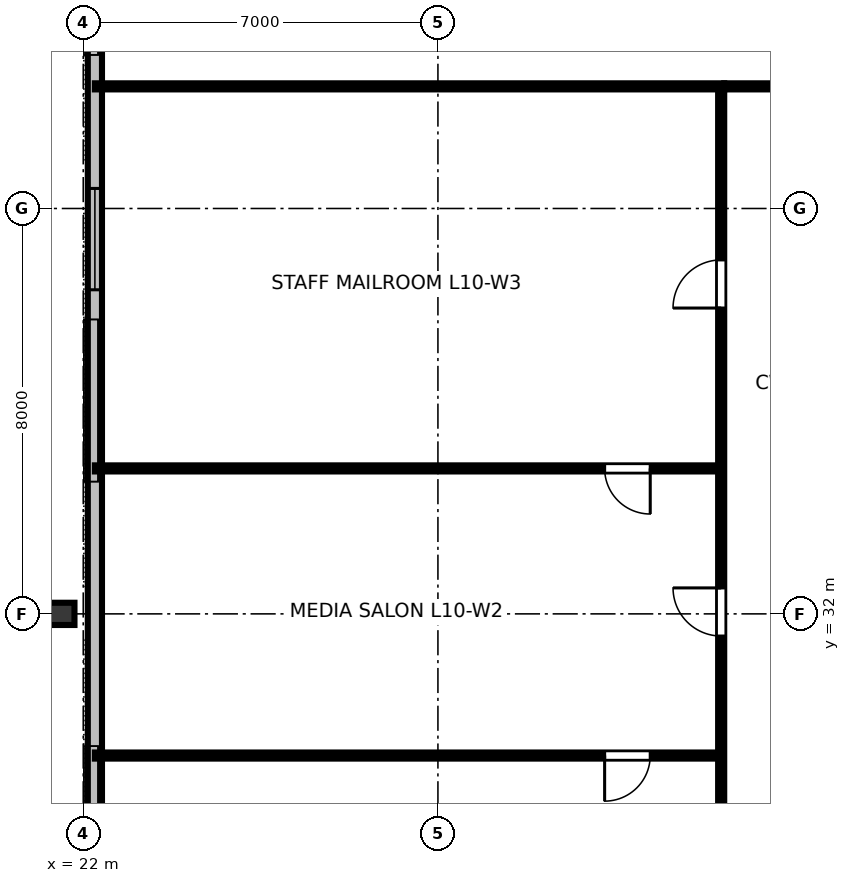
"""IFC4 building model, lengths in metres.
Left out: names, types, materials, properties, quantities, classifications, styles, units other than length and angle.
Written with IfcOpenShell. Run it as: python <this file> out.ifc"""

import sys

from ifc_helpers import new_model, si_unit, direction, frame, frame_2d, origin, origin_2d, place, context, subcontext, project, spatial, rectangle, i_section, extrude, element, fill, save


model = new_model("IFC4")
c1 = context("Model", 3, precision=1e-05, world=origin(), true_north=direction((0.0, 1.0)))
c2 = subcontext(c1, "Body", "Model", "MODEL_VIEW")
j1 = project(units=[si_unit("LENGTHUNIT", "METRE"), si_unit("PLANEANGLEUNIT", "RADIAN")], contexts=[c1])
p1 = place(None, origin())
s1 = spatial("IfcSite", under=j1, at=p1, CompositionType="ELEMENT")
p2 = place(p1, origin())
s2 = spatial("IfcBuilding", under=s1, at=p2, CompositionType="ELEMENT")
p3 = place(p2, frame((0.0, 0.0, 42.4)))
s3 = spatial("IfcBuildingStorey", under=s2, at=p3, CompositionType="ELEMENT", Elevation=42.4)
p4 = place(p3, frame((21.57, 32.0, 0.0), z_axis=(0.0, 0.0, 1.0), x_axis=(0.0, 1.0, 0.0)))
e1 = element("IfcColumn", 1, at=p4, inside=s3, PredefinedType="COLUMN", context=c2, shape_type="SweptSolid", body=[
    extrude(i_section(OverallWidth=0.439, OverallDepth=0.514, WebThickness=0.06, FlangeThickness=0.097, FilletRadius=0.025, at=origin_2d()), origin(), (0.0, 0.0, 1.0), 3.148),
])
p5 = place(p3, frame((22.23, 49.74, 0.0), z_axis=(0.0, 0.0, 1.0), x_axis=(0.0, -1.0, 0.0)))
e2 = element("IfcWall", 2, at=p5, inside=s3, PredefinedType="STANDARD", context=c2, shape_type="SweptSolid", body=[
    extrude(rectangle(XDim=35.48, YDim=0.28, at=frame_2d((17.74, 0.0))), origin(), (0.0, 0.0, 1.0), 3.15),
])
p6 = place(p5, frame((1.949, 0.0, 0.8)))
e3 = element("IfcOpeningElement", 3, at=p6, cuts=e2, PredefinedType="OPENING", context=c2, shape_type="SweptSolid", body=[
    extrude(rectangle(XDim=2.0, YDim=1.95, at=frame_2d((1.0, 0.975))), frame((0.0, 0.15, 0.0), z_axis=(0.0, -1.0, 0.0), x_axis=(1.0, 0.0, 0.0)), (0.0, 0.0, 1.0), 0.3),
])
p7 = place(p5, frame((9.344, 0.0, 0.8)))
e4 = element("IfcOpeningElement", 4, at=p7, cuts=e2, PredefinedType="OPENING", context=c2, shape_type="SweptSolid", body=[
    extrude(rectangle(XDim=2.0, YDim=1.95, at=frame_2d((1.0, 0.975))), frame((0.0, 0.15, 0.0), z_axis=(0.0, -1.0, 0.0), x_axis=(1.0, 0.0, 0.0)), (0.0, 0.0, 1.0), 0.3),
])
p8 = place(p5, frame((24.135, 0.0, 0.8)))
e5 = element("IfcOpeningElement", 5, at=p8, cuts=e2, PredefinedType="OPENING", context=c2, shape_type="SweptSolid", body=[
    extrude(rectangle(XDim=2.0, YDim=1.95, at=frame_2d((1.0, 0.975))), frame((0.0, 0.15, 0.0), z_axis=(0.0, -1.0, 0.0), x_axis=(1.0, 0.0, 0.0)), (0.0, 0.0, 1.0), 0.3),
])
p9 = place(p5, frame((31.531, 0.0, 0.8)))
e6 = element("IfcOpeningElement", 6, at=p9, cuts=e2, PredefinedType="OPENING", context=c2, shape_type="SweptSolid", body=[
    extrude(rectangle(XDim=2.0, YDim=1.95, at=frame_2d((1.0, 0.975))), frame((0.0, 0.15, 0.0), z_axis=(0.0, -1.0, 0.0), x_axis=(1.0, 0.0, 0.0)), (0.0, 0.0, 1.0), 0.3),
])
p10 = place(p3, frame((34.65, 42.41, 0.0), z_axis=(0.0, 0.0, 1.0), x_axis=(1.0, 0.0, 0.0)))
e7 = element("IfcWall", 7, at=p10, inside=s3, PredefinedType="PARTITIONING", context=c2, shape_type="SweptSolid", body=[
    extrude(rectangle(XDim=22.7, YDim=0.12, at=frame_2d((11.35, 0.0))), origin(), (0.0, 0.0, 1.0), 2.43),
])
p11 = place(p10, frame((10.875, 0.0, 0.0)))
e8 = element("IfcOpeningElement", 8, at=p11, cuts=e7, PredefinedType="OPENING", context=c2, shape_type="SweptSolid", body=[
    extrude(rectangle(XDim=0.95, YDim=2.15, at=frame_2d((0.475, 1.075))), frame((0.0, 0.07, 0.0), z_axis=(0.0, -1.0, 0.0), x_axis=(1.0, 0.0, 0.0)), (0.0, 0.0, 1.0), 0.14),
])
p12 = place(p3, frame((34.59, 29.204, 0.0), z_axis=(0.0, 0.0, 1.0), x_axis=(-1.0, 0.0, 0.0)))
e9 = element("IfcWall", 9, at=p12, inside=s3, PredefinedType="PARTITIONING", context=c2, shape_type="SweptSolid", body=[
    extrude(rectangle(XDim=12.36, YDim=0.12, at=frame_2d((6.18, 0.0))), origin(), (0.0, 0.0, 1.0), 2.43),
])
p13 = place(p12, frame((1.4, 0.0, 0.0)))
e10 = element("IfcOpeningElement", 10, at=p13, cuts=e9, PredefinedType="OPENING", context=c2, shape_type="SweptSolid", body=[
    extrude(rectangle(XDim=0.9, YDim=2.15, at=frame_2d((0.45, 1.075))), frame((0.0, 0.07, 0.0), z_axis=(0.0, -1.0, 0.0), x_axis=(1.0, 0.0, 0.0)), (0.0, 0.0, 1.0), 0.14),
])
p14 = place(p3, frame((34.59, 34.871, 0.0), z_axis=(0.0, 0.0, 1.0), x_axis=(-1.0, 0.0, 0.0)))
e11 = element("IfcWall", 11, at=p14, inside=s3, PredefinedType="PARTITIONING", context=c2, shape_type="SweptSolid", body=[
    extrude(rectangle(XDim=12.36, YDim=0.12, at=frame_2d((6.18, 0.0))), origin(), (0.0, 0.0, 1.0), 2.43),
])
p15 = place(p14, frame((1.4, 0.0, 0.0)))
e12 = element("IfcOpeningElement", 12, at=p15, cuts=e11, PredefinedType="OPENING", context=c2, shape_type="SweptSolid", body=[
    extrude(rectangle(XDim=0.9, YDim=2.15, at=frame_2d((0.45, 1.075))), frame((0.0, 0.07, 0.0), z_axis=(0.0, -1.0, 0.0), x_axis=(1.0, 0.0, 0.0)), (0.0, 0.0, 1.0), 0.14),
])
p16 = place(p3, frame((34.59, 21.65, 0.0), z_axis=(0.0, 0.0, 1.0), x_axis=(0.0, 1.0, 0.0)))
e13 = element("IfcWall", 13, at=p16, inside=s3, PredefinedType="PARTITIONING", context=c2, shape_type="SweptSolid", body=[
    extrude(rectangle(XDim=20.7, YDim=0.12, at=frame_2d((10.35, 0.0))), origin(), (0.0, 0.0, 1.0), 2.43),
])
p17 = place(p16, frame((3.402, 0.0, 0.0)))
e14 = element("IfcOpeningElement", 14, at=p17, cuts=e13, PredefinedType="OPENING", context=c2, shape_type="SweptSolid", body=[
    extrude(rectangle(XDim=0.95, YDim=2.15, at=frame_2d((0.475, 1.075))), frame((0.0, 0.07, 0.0), z_axis=(0.0, -1.0, 0.0), x_axis=(1.0, 0.0, 0.0)), (0.0, 0.0, 1.0), 0.14),
])
p18 = place(p16, frame((9.912, 0.0, 0.0)))
e15 = element("IfcOpeningElement", 15, at=p18, cuts=e13, PredefinedType="OPENING", context=c2, shape_type="SweptSolid", body=[
    extrude(rectangle(XDim=0.95, YDim=2.15, at=frame_2d((0.475, 1.075))), frame((0.0, 0.07, 0.0), z_axis=(0.0, -1.0, 0.0), x_axis=(1.0, 0.0, 0.0)), (0.0, 0.0, 1.0), 0.14),
])
p19 = place(p16, frame((16.385, 0.0, 0.0)))
e16 = element("IfcOpeningElement", 16, at=p19, cuts=e13, PredefinedType="OPENING", context=c2, shape_type="SweptSolid", body=[
    extrude(rectangle(XDim=0.95, YDim=2.15, at=frame_2d((0.475, 1.075))), frame((0.0, 0.07, 0.0), z_axis=(0.0, -1.0, 0.0), x_axis=(1.0, 0.0, 0.0)), (0.0, 0.0, 1.0), 0.14),
])
p20 = place(p3, frame((34.65, 42.41, 0.0), z_axis=(0.0, 0.0, 1.0), x_axis=(-1.0, 0.0, 0.0)))
e17 = element("IfcWall", 17, at=p20, inside=s3, PredefinedType="PARTITIONING", context=c2, shape_type="SweptSolid", body=[
    extrude(rectangle(XDim=12.42, YDim=0.12, at=frame_2d((6.21, 0.0))), origin(), (0.0, 0.0, 1.0), 2.43),
])
p21 = place(p7, origin())
e18 = element("IfcWindow", 18, at=p21, inside=s3, PartitioningType="SINGLE_PANEL", PredefinedType="WINDOW", context=c2, shape_type="SweptSolid", body=[
    extrude(rectangle(XDim=2.0, YDim=1.95, at=frame_2d((1.0, 0.975))), frame((0.0, 0.03, 0.0), z_axis=(0.0, -1.0, 0.0), x_axis=(1.0, 0.0, 0.0)), (0.0, 0.0, 1.0), 0.06),
])
fill(e4, e18)
p22 = place(p13, origin())
e19 = element("IfcDoor", 19, at=p22, inside=s3, OperationType="SINGLE_SWING_RIGHT", PredefinedType="DOOR", context=c2, shape_type="SweptSolid", body=[
    extrude(rectangle(XDim=0.9, YDim=2.15, at=frame_2d((0.45, 1.075))), frame((0.0, 0.025, 0.0), z_axis=(0.0, -1.0, 0.0), x_axis=(1.0, 0.0, 0.0)), (0.0, 0.0, 1.0), 0.05),
])
fill(e10, e19)
p23 = place(p15, origin())
e20 = element("IfcDoor", 20, at=p23, inside=s3, OperationType="SINGLE_SWING_LEFT", PredefinedType="DOOR", context=c2, shape_type="SweptSolid", body=[
    extrude(rectangle(XDim=0.9, YDim=2.15, at=frame_2d((0.45, 1.075))), frame((0.0, 0.025, 0.0), z_axis=(0.0, -1.0, 0.0), x_axis=(1.0, 0.0, 0.0)), (0.0, 0.0, 1.0), 0.05),
])
fill(e12, e20)
p24 = place(p18, origin())
e21 = element("IfcDoor", 21, at=p24, inside=s3, OperationType="SINGLE_SWING_RIGHT", PredefinedType="DOOR", context=c2, shape_type="SweptSolid", body=[
    extrude(rectangle(XDim=0.95, YDim=2.15, at=frame_2d((0.475, 1.075))), frame((0.0, 0.025, 0.0), z_axis=(0.0, -1.0, 0.0), x_axis=(1.0, 0.0, 0.0)), (0.0, 0.0, 1.0), 0.05),
])
fill(e15, e21)
p25 = place(p19, origin())
e22 = element("IfcDoor", 22, at=p25, inside=s3, OperationType="SINGLE_SWING_LEFT", PredefinedType="DOOR", context=c2, shape_type="SweptSolid", body=[
    extrude(rectangle(XDim=0.95, YDim=2.15, at=frame_2d((0.475, 1.075))), frame((0.0, 0.025, 0.0), z_axis=(0.0, -1.0, 0.0), x_axis=(1.0, 0.0, 0.0)), (0.0, 0.0, 1.0), 0.05),
])
fill(e16, e22)
save(model, sys.argv[1])
